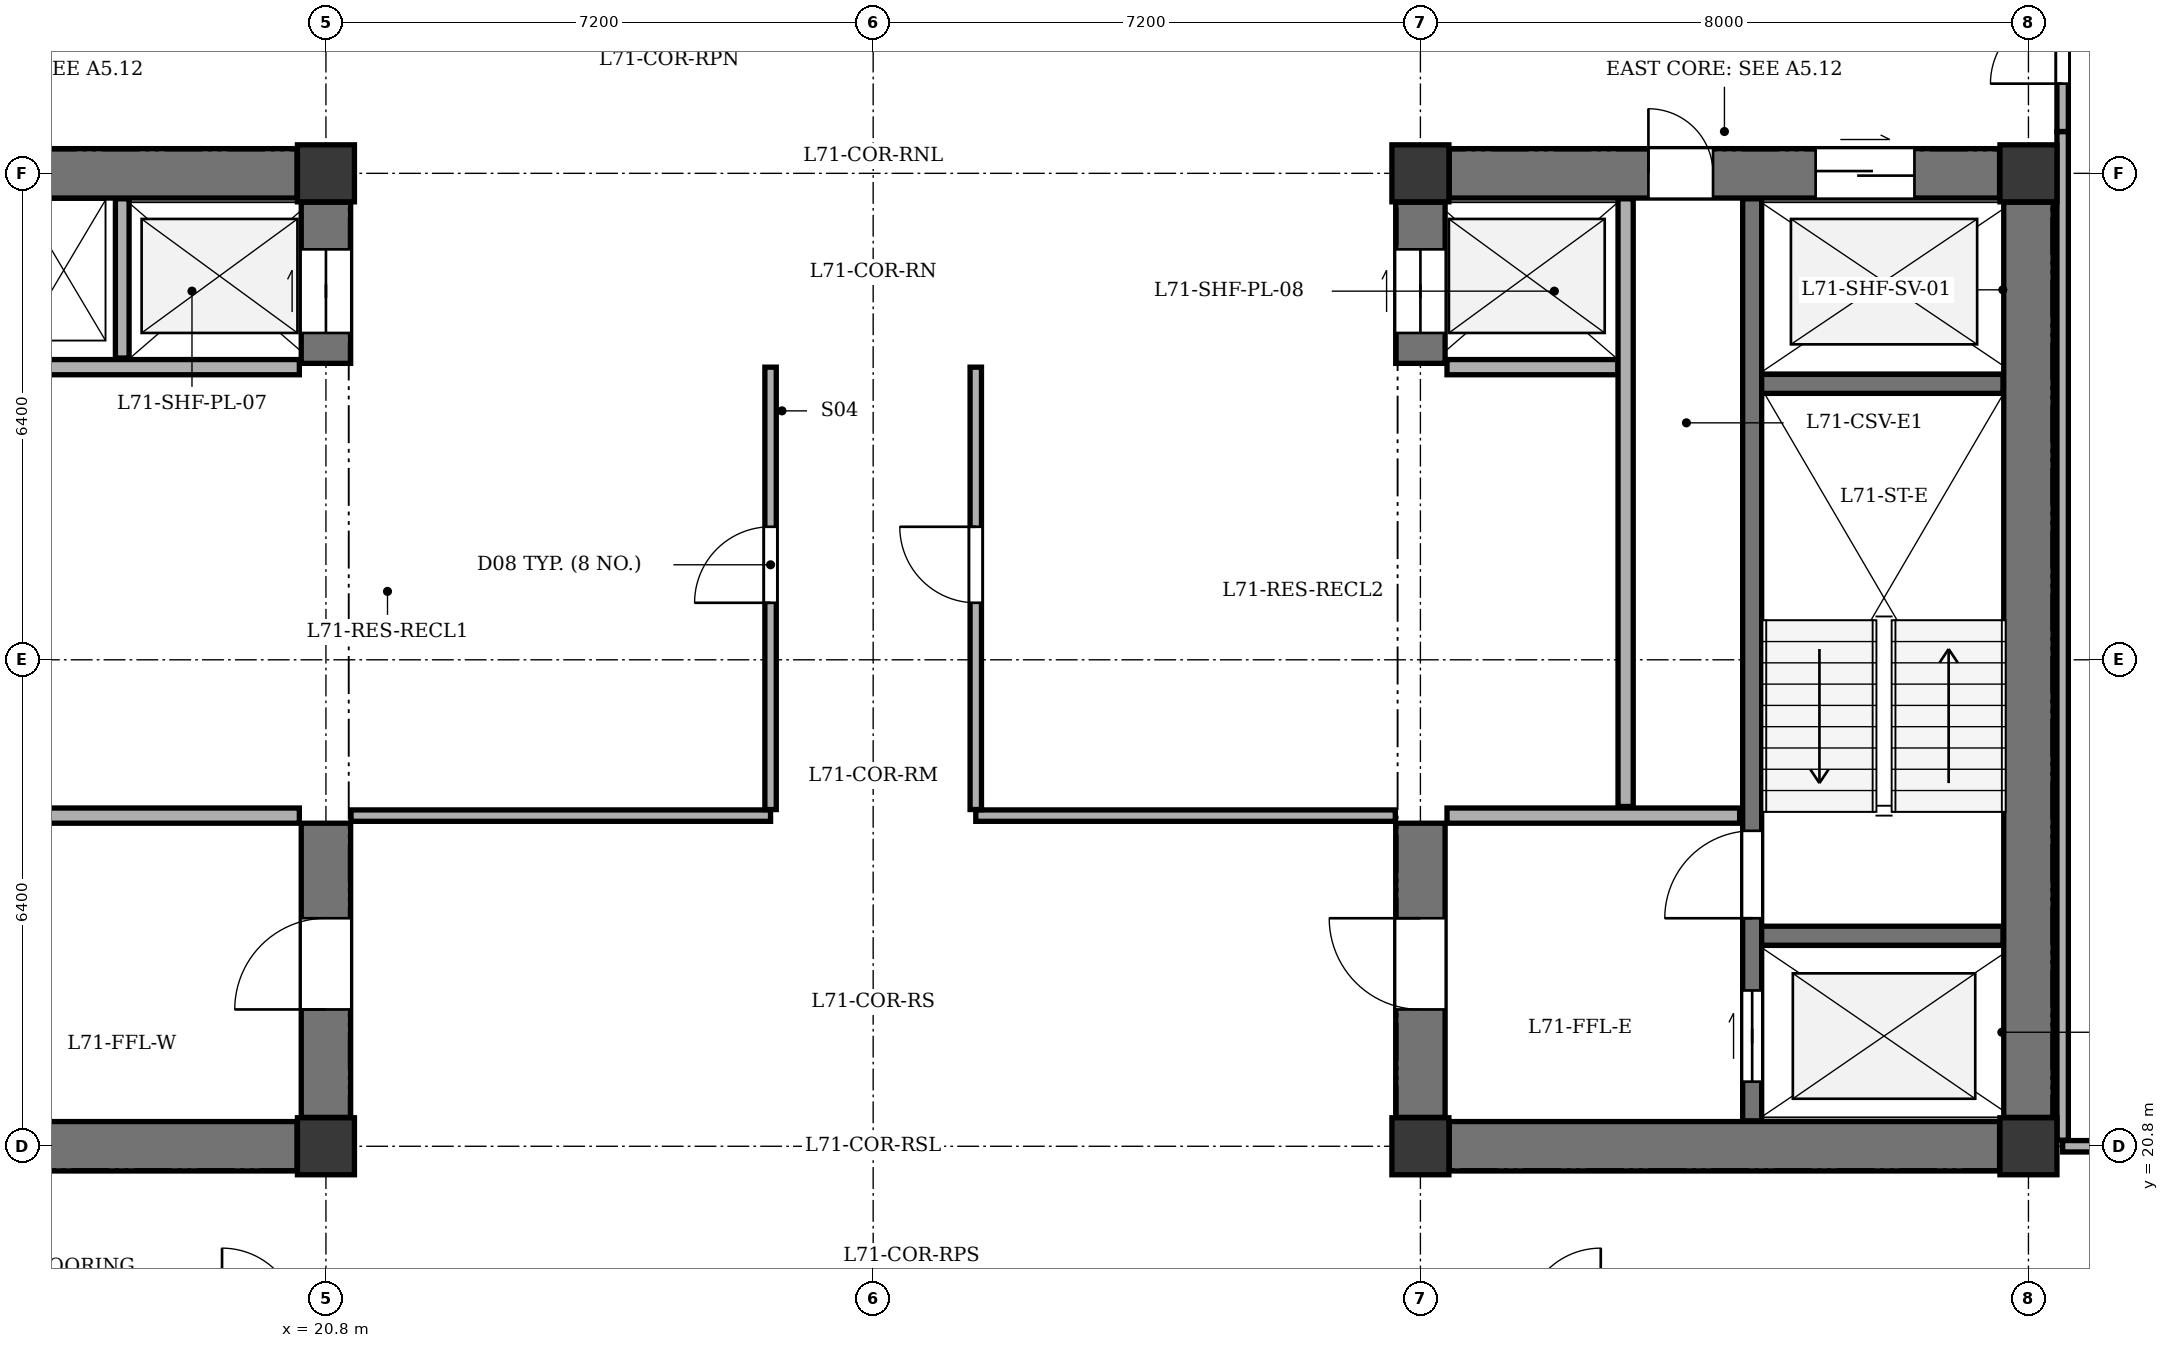
"""IFC4 building model, lengths in metres.
Left out: names, types, materials, properties, quantities, classifications, styles, units other than length and angle.
Written with IfcOpenShell. Run it as: python <this file> out.ifc"""

import sys

from ifc_helpers import new_model, si_unit, direction, frame, frame_2d, origin, origin_2d, place, context, subcontext, project, spatial, rectangle, extrude, element, fill, save


model = new_model("IFC4")
c1 = context("Model", 3, precision=1e-05, world=origin(), true_north=direction((0.0, 1.0)))
c2 = subcontext(c1, "Body", "Model", "MODEL_VIEW")
j1 = project(units=[si_unit("LENGTHUNIT", "METRE"), si_unit("PLANEANGLEUNIT", "RADIAN")], contexts=[c1])
p1 = place(None, origin())
s1 = spatial("IfcSite", under=j1, at=p1, CompositionType="ELEMENT")
p2 = place(p1, origin())
s2 = spatial("IfcBuilding", under=s1, at=p2, CompositionType="ELEMENT")
p3 = place(p2, frame((0.0, 0.0, 268.7)))
s3 = spatial("IfcBuildingStorey", under=s2, at=p3, CompositionType="ELEMENT", Elevation=268.7)
for number, where, z_axis, x_axis in (
    (1, (20.8, 20.8, 0.0), (0.0, 0.0, 1.0), (1.0, 0.0, 0.0)),
    (2, (20.8, 33.6, 0.0), (0.0, 0.0, 1.0), (1.0, 0.0, 0.0)),
    (3, (35.2, 20.8, 0.0), (0.0, 0.0, 1.0), (1.0, 0.0, 0.0)),
    (4, (43.2, 20.8, 0.0), (0.0, 0.0, 1.0), (1.0, 0.0, 0.0)),
    (5, (35.2, 33.6, 0.0), (0.0, 0.0, 1.0), (1.0, 0.0, 0.0)),
    (6, (43.2, 33.6, 0.0), (0.0, 0.0, 1.0), (1.0, 0.0, 0.0)),
):
    element("IfcColumn", number, at=place(p3, frame(where, z_axis=z_axis, x_axis=x_axis)), inside=s3, PredefinedType="COLUMN", context=c2, shape_type="SweptSolid", body=[
        extrude(rectangle(XDim=0.75, YDim=0.75, at=origin_2d()), origin(), (0.0, 0.0, 1.0), 3.4),
    ])
p4 = place(p3, frame((13.18, 20.8, 0.0), z_axis=(0.0, 0.0, 1.0), x_axis=(1.0, 0.0, 0.0)))
e7 = element("IfcWall", 7, at=p4, inside=s3, PredefinedType="SHEAR", context=c2, shape_type="SweptSolid", body=[
    extrude(rectangle(XDim=7.24, YDim=0.65, at=frame_2d((3.62, 0.0))), origin(), (0.0, 0.0, 1.0), 3.1),
])
p5 = place(p3, frame((13.18, 33.6, 0.0), z_axis=(0.0, 0.0, 1.0), x_axis=(1.0, 0.0, 0.0)))
e8 = element("IfcWall", 8, at=p5, inside=s3, PredefinedType="SHEAR", context=c2, shape_type="SweptSolid", body=[
    extrude(rectangle(XDim=7.24, YDim=0.65, at=frame_2d((3.62, 0.0))), origin(), (0.0, 0.0, 1.0), 3.1),
])
p6 = place(p5, frame((1.22, 0.0, 0.0)))
e9 = element("IfcOpeningElement", 9, at=p6, cuts=e8, PredefinedType="OPENING", context=c2, shape_type="SweptSolid", body=[
    extrude(rectangle(XDim=0.85, YDim=2.02, at=frame_2d((0.425, 1.01))), frame((0.0, 0.335, 0.0), z_axis=(0.0, -1.0, 0.0), x_axis=(1.0, 0.0, 0.0)), (0.0, 0.0, 1.0), 0.67),
])
p7 = place(p3, frame((20.8, 21.18, 0.0), z_axis=(0.0, 0.0, 1.0), x_axis=(0.0, 1.0, 0.0)))
e10 = element("IfcWall", 10, at=p7, inside=s3, PredefinedType="SHEAR", context=c2, shape_type="SweptSolid", body=[
    extrude(rectangle(XDim=3.87, YDim=0.65, at=frame_2d((1.935, 0.0))), origin(), (0.0, 0.0, 1.0), 3.1),
])
p8 = place(p7, frame((1.42, 0.0, 0.0)))
e11 = element("IfcOpeningElement", 11, at=p8, cuts=e10, PredefinedType="OPENING", context=c2, shape_type="SweptSolid", body=[
    extrude(rectangle(XDim=1.2, YDim=2.15, at=frame_2d((0.6, 1.075))), frame((0.0, 0.335, 0.0), z_axis=(0.0, -1.0, 0.0), x_axis=(1.0, 0.0, 0.0)), (0.0, 0.0, 1.0), 0.67),
])
p9 = place(p3, frame((20.8, 31.1, 0.0), z_axis=(0.0, 0.0, 1.0), x_axis=(0.0, 1.0, 0.0)))
e12 = element("IfcWall", 12, at=p9, inside=s3, PredefinedType="SHEAR", context=c2, shape_type="SweptSolid", body=[
    extrude(rectangle(XDim=2.12, YDim=0.65, at=frame_2d((1.06, 0.0))), origin(), (0.0, 0.0, 1.0), 3.1),
])
p10 = place(p9, frame((0.4, 0.0, 0.0)))
e13 = element("IfcOpeningElement", 13, at=p10, cuts=e12, PredefinedType="OPENING", context=c2, shape_type="SweptSolid", body=[
    extrude(rectangle(XDim=1.1, YDim=2.1, at=frame_2d((0.55, 1.05))), frame((0.0, 0.335, 0.0), z_axis=(0.0, -1.0, 0.0), x_axis=(1.0, 0.0, 0.0)), (0.0, 0.0, 1.0), 0.67),
])
for number, where, z_axis, x_axis in (
    (14, (16.6, 25.15, 0.0), (0.0, 0.0, 1.0), (1.0, 0.0, 0.0)),
    (15, (16.6, 31.05, 0.0), (0.0, 0.0, 1.0), (1.0, 0.0, 0.0)),
):
    element("IfcWall", number, at=place(p3, frame(where, z_axis=z_axis, x_axis=x_axis)), inside=s3, PredefinedType="SOLIDWALL", context=c2, shape_type="SweptSolid", body=[
        extrude(rectangle(XDim=3.85, YDim=0.2, at=frame_2d((1.925, 0.0))), origin(), (0.0, 0.0, 1.0), 3.1),
    ])
p11 = place(p3, frame((18.12, 31.17, 0.0), z_axis=(0.0, 0.0, 1.0), x_axis=(0.0, 1.0, 0.0)))
e16 = element("IfcWall", 16, at=p11, inside=s3, PredefinedType="PARTITIONING", context=c2, shape_type="SweptSolid", body=[
    extrude(rectangle(XDim=2.095, YDim=0.18, at=frame_2d((1.047, 0.0))), origin(), (0.0, 0.0, 1.0), 3.1),
])
p12 = place(p3, frame((43.2, 21.18, 0.0), z_axis=(0.0, 0.0, 1.0), x_axis=(0.0, 1.0, 0.0)))
e17 = element("IfcWall", 17, at=p12, inside=s3, PredefinedType="SHEAR", context=c2, shape_type="SweptSolid", body=[
    extrude(rectangle(XDim=12.04, YDim=0.65, at=frame_2d((6.02, 0.0))), origin(), (0.0, 0.0, 1.0), 3.1),
])
p13 = place(p3, frame((35.58, 20.8, 0.0), z_axis=(0.0, 0.0, 1.0), x_axis=(1.0, 0.0, 0.0)))
e18 = element("IfcWall", 18, at=p13, inside=s3, PredefinedType="SHEAR", context=c2, shape_type="SweptSolid", body=[
    extrude(rectangle(XDim=7.24, YDim=0.65, at=frame_2d((3.62, 0.0))), origin(), (0.0, 0.0, 1.0), 3.1),
])
p14 = place(p3, frame((35.58, 33.6, 0.0), z_axis=(0.0, 0.0, 1.0), x_axis=(1.0, 0.0, 0.0)))
e19 = element("IfcWall", 19, at=p14, inside=s3, PredefinedType="SHEAR", context=c2, shape_type="SweptSolid", body=[
    extrude(rectangle(XDim=7.24, YDim=0.65, at=frame_2d((3.62, 0.0))), origin(), (0.0, 0.0, 1.0), 3.1),
])
p15 = place(p14, frame((4.82, 0.0, 0.0)))
e20 = element("IfcOpeningElement", 20, at=p15, cuts=e19, PredefinedType="OPENING", context=c2, shape_type="SweptSolid", body=[
    extrude(rectangle(XDim=1.3, YDim=2.15, at=frame_2d((0.65, 1.075))), frame((0.0, 0.335, 0.0), z_axis=(0.0, -1.0, 0.0), x_axis=(1.0, 0.0, 0.0)), (0.0, 0.0, 1.0), 0.67),
])
p16 = place(p14, frame((2.62, 0.0, 0.0)))
e21 = element("IfcOpeningElement", 21, at=p16, cuts=e19, PredefinedType="OPENING", context=c2, shape_type="SweptSolid", body=[
    extrude(rectangle(XDim=0.85, YDim=2.02, at=frame_2d((0.425, 1.01))), frame((0.0, 0.335, 0.0), z_axis=(0.0, -1.0, 0.0), x_axis=(1.0, 0.0, 0.0)), (0.0, 0.0, 1.0), 0.67),
])
p17 = place(p3, frame((35.2, 21.18, 0.0), z_axis=(0.0, 0.0, 1.0), x_axis=(0.0, 1.0, 0.0)))
e22 = element("IfcWall", 22, at=p17, inside=s3, PredefinedType="SHEAR", context=c2, shape_type="SweptSolid", body=[
    extrude(rectangle(XDim=3.87, YDim=0.65, at=frame_2d((1.935, 0.0))), origin(), (0.0, 0.0, 1.0), 3.1),
])
p18 = place(p17, frame((1.42, 0.0, 0.0)))
e23 = element("IfcOpeningElement", 23, at=p18, cuts=e22, PredefinedType="OPENING", context=c2, shape_type="SweptSolid", body=[
    extrude(rectangle(XDim=1.2, YDim=2.15, at=frame_2d((0.6, 1.075))), frame((0.0, 0.335, 0.0), z_axis=(0.0, -1.0, 0.0), x_axis=(1.0, 0.0, 0.0)), (0.0, 0.0, 1.0), 0.67),
])
p19 = place(p3, frame((35.2, 31.1, 0.0), z_axis=(0.0, 0.0, 1.0), x_axis=(0.0, 1.0, 0.0)))
e24 = element("IfcWall", 24, at=p19, inside=s3, PredefinedType="SHEAR", context=c2, shape_type="SweptSolid", body=[
    extrude(rectangle(XDim=2.12, YDim=0.65, at=frame_2d((1.06, 0.0))), origin(), (0.0, 0.0, 1.0), 3.1),
])
p20 = place(p19, frame((0.4, 0.0, 0.0)))
e25 = element("IfcOpeningElement", 25, at=p20, cuts=e24, PredefinedType="OPENING", context=c2, shape_type="SweptSolid", body=[
    extrude(rectangle(XDim=1.1, YDim=2.1, at=frame_2d((0.55, 1.05))), frame((0.0, 0.335, 0.0), z_axis=(0.0, -1.0, 0.0), x_axis=(1.0, 0.0, 0.0)), (0.0, 0.0, 1.0), 0.67),
])
p21 = place(p3, frame((39.565, 21.135, 0.0), z_axis=(0.0, 0.0, 1.0), x_axis=(0.0, 1.0, 0.0)))
e26 = element("IfcWall", 26, at=p21, inside=s3, PredefinedType="SHEAR", context=c2, shape_type="SweptSolid", body=[
    extrude(rectangle(XDim=12.13, YDim=0.25, at=frame_2d((6.065, 0.0))), origin(), (0.0, 0.0, 1.0), 3.1),
])
p22 = place(p21, frame((0.515, 0.0, 0.0)))
e27 = element("IfcOpeningElement", 27, at=p22, cuts=e26, PredefinedType="OPENING", context=c2, shape_type="SweptSolid", body=[
    extrude(rectangle(XDim=1.2, YDim=2.15, at=frame_2d((0.6, 1.075))), frame((0.0, 0.135, 0.0), z_axis=(0.0, -1.0, 0.0), x_axis=(1.0, 0.0, 0.0)), (0.0, 0.0, 1.0), 0.27),
])
p23 = place(p21, frame((2.665, 0.0, 0.0)))
e28 = element("IfcOpeningElement", 28, at=p23, cuts=e26, PredefinedType="OPENING", context=c2, shape_type="SweptSolid", body=[
    extrude(rectangle(XDim=1.15, YDim=2.15, at=frame_2d((0.575, 1.075))), frame((0.0, 0.135, 0.0), z_axis=(0.0, -1.0, 0.0), x_axis=(1.0, 0.0, 0.0)), (0.0, 0.0, 1.0), 0.27),
])
for number, where, z_axis, x_axis in (
    (29, (39.69, 23.57, 0.0), (0.0, 0.0, 1.0), (1.0, 0.0, 0.0)),
    (30, (39.69, 30.83, 0.0), (0.0, 0.0, 1.0), (1.0, 0.0, 0.0)),
):
    element("IfcWall", number, at=place(p3, frame(where, z_axis=z_axis, x_axis=x_axis)), inside=s3, PredefinedType="SHEAR", context=c2, shape_type="SweptSolid", body=[
        extrude(rectangle(XDim=3.175, YDim=0.25, at=frame_2d((1.587, 0.0))), origin(), (0.0, 0.0, 1.0), 3.1),
    ])
p24 = place(p3, frame((35.55, 25.15, 0.0), z_axis=(0.0, 0.0, 1.0), x_axis=(1.0, 0.0, 0.0)))
e31 = element("IfcWall", 31, at=p24, inside=s3, PredefinedType="SOLIDWALL", context=c2, shape_type="SweptSolid", body=[
    extrude(rectangle(XDim=3.85, YDim=0.2, at=frame_2d((1.925, 0.0))), origin(), (0.0, 0.0, 1.0), 3.1),
])
p25 = place(p3, frame((35.55, 31.05, 0.0), z_axis=(0.0, 0.0, 1.0), x_axis=(1.0, 0.0, 0.0)))
e32 = element("IfcWall", 32, at=p25, inside=s3, PredefinedType="SOLIDWALL", context=c2, shape_type="SweptSolid", body=[
    extrude(rectangle(XDim=2.25, YDim=0.2, at=frame_2d((1.125, 0.0))), origin(), (0.0, 0.0, 1.0), 3.1),
])
p26 = place(p3, frame((37.9, 25.27, 0.0), z_axis=(0.0, 0.0, 1.0), x_axis=(0.0, 1.0, 0.0)))
e33 = element("IfcWall", 33, at=p26, inside=s3, PredefinedType="SOLIDWALL", context=c2, shape_type="SweptSolid", body=[
    extrude(rectangle(XDim=7.995, YDim=0.2, at=frame_2d((3.998, 0.0))), origin(), (0.0, 0.0, 1.0), 3.1),
])
for number, where, z_axis, x_axis in (
    (34, (21.13, 25.15, 0.0), (0.0, 0.0, 1.0), (1.0, 0.0, 0.0)),
    (35, (29.35, 25.15, 0.0), (0.0, 0.0, 1.0), (1.0, 0.0, 0.0)),
):
    element("IfcWall", number, at=place(p3, frame(where, z_axis=z_axis, x_axis=x_axis)), inside=s3, PredefinedType="PARTITIONING", context=c2, shape_type="SweptSolid", body=[
        extrude(rectangle(XDim=5.52, YDim=0.15, at=frame_2d((2.76, 0.0))), origin(), (0.0, 0.0, 1.0), 3.1),
    ])
p27 = place(p3, frame((26.65, 25.23, 0.0), z_axis=(0.0, 0.0, 1.0), x_axis=(0.0, 1.0, 0.0)))
e36 = element("IfcWall", 36, at=p27, inside=s3, PredefinedType="PARTITIONING", context=c2, shape_type="SweptSolid", body=[
    extrude(rectangle(XDim=5.82, YDim=0.15, at=frame_2d((2.91, 0.0))), origin(), (0.0, 0.0, 1.0), 3.1),
])
p28 = place(p27, frame((2.72, 0.0, 0.0)))
e37 = element("IfcOpeningElement", 37, at=p28, cuts=e36, PredefinedType="OPENING", context=c2, shape_type="SweptSolid", body=[
    extrude(rectangle(XDim=1.0, YDim=2.1, at=frame_2d((0.5, 1.05))), frame((0.0, 0.085, 0.0), z_axis=(0.0, -1.0, 0.0), x_axis=(1.0, 0.0, 0.0)), (0.0, 0.0, 1.0), 0.17),
])
p29 = place(p3, frame((29.35, 25.23, 0.0), z_axis=(0.0, 0.0, 1.0), x_axis=(0.0, 1.0, 0.0)))
e38 = element("IfcWall", 38, at=p29, inside=s3, PredefinedType="PARTITIONING", context=c2, shape_type="SweptSolid", body=[
    extrude(rectangle(XDim=5.82, YDim=0.15, at=frame_2d((2.91, 0.0))), origin(), (0.0, 0.0, 1.0), 3.1),
])
p30 = place(p29, frame((2.72, 0.0, 0.0)))
e39 = element("IfcOpeningElement", 39, at=p30, cuts=e38, PredefinedType="OPENING", context=c2, shape_type="SweptSolid", body=[
    extrude(rectangle(XDim=1.0, YDim=2.1, at=frame_2d((0.5, 1.05))), frame((0.0, 0.085, 0.0), z_axis=(0.0, -1.0, 0.0), x_axis=(1.0, 0.0, 0.0)), (0.0, 0.0, 1.0), 0.17),
])
p31 = place(p3, frame((43.65, 20.8, 0.0), z_axis=(0.0, 0.0, 1.0), x_axis=(1.0, 0.0, 0.0)))
e40 = element("IfcWall", 40, at=p31, inside=s3, PredefinedType="PARTITIONING", context=c2, shape_type="SweptSolid", body=[
    extrude(rectangle(XDim=5.305, YDim=0.15, at=frame_2d((2.653, 0.0))), origin(), (0.0, 0.0, 1.0), 2.535),
])
p32 = place(p3, frame((43.65, 20.88, 0.0), z_axis=(0.0, 0.0, 1.0), x_axis=(0.0, 1.0, 0.0)))
e41 = element("IfcWall", 41, at=p32, inside=s3, PredefinedType="PARTITIONING", context=c2, shape_type="SweptSolid", body=[
    extrude(rectangle(XDim=13.27, YDim=0.15, at=frame_2d((6.635, 0.0))), origin(), (0.0, 0.0, 1.0), 3.1),
])
p33 = place(p3, frame((43.65, 34.15, 0.0), z_axis=(0.0, 0.0, 1.0), x_axis=(0.0, 1.0, 0.0)))
e42 = element("IfcWall", 42, at=p33, inside=s3, PredefinedType="PARTITIONING", context=c2, shape_type="SweptSolid", body=[
    extrude(rectangle(XDim=1.79, YDim=0.15, at=frame_2d((0.895, 0.0))), origin(), (0.0, 0.0, 1.0), 3.1),
])
p34 = place(p33, frame((0.63, 0.0, 0.0)))
e43 = element("IfcOpeningElement", 43, at=p34, cuts=e42, PredefinedType="OPENING", context=c2, shape_type="SweptSolid", body=[
    extrude(rectangle(XDim=0.95, YDim=2.1, at=frame_2d((0.475, 1.05))), frame((0.0, 0.085, 0.0), z_axis=(0.0, -1.0, 0.0), x_axis=(1.0, 0.0, 0.0)), (0.0, 0.0, 1.0), 0.17),
])
p35 = place(p8, origin())
e44 = element("IfcDoor", 44, at=p35, inside=s3, OperationType="SINGLE_SWING_LEFT", PredefinedType="DOOR", context=c2, shape_type="SweptSolid", body=[
    extrude(rectangle(XDim=1.2, YDim=2.15, at=frame_2d((0.6, 1.075))), frame((0.0, 0.025, 0.0), z_axis=(0.0, -1.0, 0.0), x_axis=(1.0, 0.0, 0.0)), (0.0, 0.0, 1.0), 0.05),
])
fill(e11, e44)
p36 = place(p10, origin())
e45 = element("IfcDoor", 45, at=p36, inside=s3, OperationType="DOUBLE_DOOR_SLIDING", PredefinedType="DOOR", context=c2, shape_type="SweptSolid", body=[
    extrude(rectangle(XDim=1.1, YDim=2.1, at=frame_2d((0.55, 1.05))), frame((0.0, 0.025, 0.0), z_axis=(0.0, -1.0, 0.0), x_axis=(1.0, 0.0, 0.0)), (0.0, 0.0, 1.0), 0.05),
])
fill(e13, e45)
p37 = place(p15, origin())
e46 = element("IfcDoor", 46, at=p37, inside=s3, OperationType="DOUBLE_DOOR_SLIDING", PredefinedType="DOOR", context=c2, shape_type="SweptSolid", body=[
    extrude(rectangle(XDim=1.3, YDim=2.15, at=frame_2d((0.65, 1.075))), frame((0.0, 0.025, 0.0), z_axis=(0.0, -1.0, 0.0), x_axis=(1.0, 0.0, 0.0)), (0.0, 0.0, 1.0), 0.05),
])
fill(e20, e46)
p38 = place(p16, origin())
e47 = element("IfcDoor", 47, at=p38, inside=s3, OperationType="SINGLE_SWING_LEFT", PredefinedType="DOOR", context=c2, shape_type="SweptSolid", body=[
    extrude(rectangle(XDim=0.85, YDim=2.02, at=frame_2d((0.425, 1.01))), frame((0.0, 0.025, 0.0), z_axis=(0.0, -1.0, 0.0), x_axis=(1.0, 0.0, 0.0)), (0.0, 0.0, 1.0), 0.05),
])
fill(e21, e47)
p39 = place(p18, origin())
e48 = element("IfcDoor", 48, at=p39, inside=s3, OperationType="SINGLE_SWING_RIGHT", PredefinedType="DOOR", context=c2, shape_type="SweptSolid", body=[
    extrude(rectangle(XDim=1.2, YDim=2.15, at=frame_2d((0.6, 1.075))), frame((0.0, 0.025, 0.0), z_axis=(0.0, -1.0, 0.0), x_axis=(1.0, 0.0, 0.0)), (0.0, 0.0, 1.0), 0.05),
])
fill(e23, e48)
p40 = place(p20, origin())
e49 = element("IfcDoor", 49, at=p40, inside=s3, OperationType="DOUBLE_DOOR_SLIDING", PredefinedType="DOOR", context=c2, shape_type="SweptSolid", body=[
    extrude(rectangle(XDim=1.1, YDim=2.1, at=frame_2d((0.55, 1.05))), frame((0.0, 0.025, 0.0), z_axis=(0.0, -1.0, 0.0), x_axis=(1.0, 0.0, 0.0)), (0.0, 0.0, 1.0), 0.05),
])
fill(e25, e49)
p41 = place(p22, origin())
e50 = element("IfcDoor", 50, at=p41, inside=s3, OperationType="DOUBLE_DOOR_SLIDING", PredefinedType="DOOR", context=c2, shape_type="SweptSolid", body=[
    extrude(rectangle(XDim=1.2, YDim=2.15, at=frame_2d((0.6, 1.075))), frame((0.0, 0.025, 0.0), z_axis=(0.0, -1.0, 0.0), x_axis=(1.0, 0.0, 0.0)), (0.0, 0.0, 1.0), 0.05),
])
fill(e27, e50)
p42 = place(p23, origin())
e51 = element("IfcDoor", 51, at=p42, inside=s3, OperationType="SINGLE_SWING_LEFT", PredefinedType="DOOR", context=c2, shape_type="SweptSolid", body=[
    extrude(rectangle(XDim=1.15, YDim=2.15, at=frame_2d((0.575, 1.075))), frame((0.0, 0.025, 0.0), z_axis=(0.0, -1.0, 0.0), x_axis=(1.0, 0.0, 0.0)), (0.0, 0.0, 1.0), 0.05),
])
fill(e28, e51)
p43 = place(p28, origin())
e52 = element("IfcDoor", 52, at=p43, inside=s3, OperationType="SINGLE_SWING_LEFT", PredefinedType="DOOR", context=c2, shape_type="SweptSolid", body=[
    extrude(rectangle(XDim=1.0, YDim=2.1, at=frame_2d((0.5, 1.05))), frame((0.0, 0.025, 0.0), z_axis=(0.0, -1.0, 0.0), x_axis=(1.0, 0.0, 0.0)), (0.0, 0.0, 1.0), 0.05),
])
fill(e37, e52)
p44 = place(p30, origin())
e53 = element("IfcDoor", 53, at=p44, inside=s3, OperationType="SINGLE_SWING_RIGHT", PredefinedType="DOOR", context=c2, shape_type="SweptSolid", body=[
    extrude(rectangle(XDim=1.0, YDim=2.1, at=frame_2d((0.5, 1.05))), frame((0.0, 0.025, 0.0), z_axis=(0.0, -1.0, 0.0), x_axis=(1.0, 0.0, 0.0)), (0.0, 0.0, 1.0), 0.05),
])
fill(e39, e53)
p45 = place(p34, origin())
e54 = element("IfcDoor", 54, at=p45, inside=s3, OperationType="SINGLE_SWING_LEFT", PredefinedType="DOOR", context=c2, shape_type="SweptSolid", body=[
    extrude(rectangle(XDim=0.95, YDim=2.1, at=frame_2d((0.475, 1.05))), frame((0.0, 0.025, 0.0), z_axis=(0.0, -1.0, 0.0), x_axis=(1.0, 0.0, 0.0)), (0.0, 0.0, 1.0), 0.05),
])
fill(e43, e54)
save(model, sys.argv[1])
